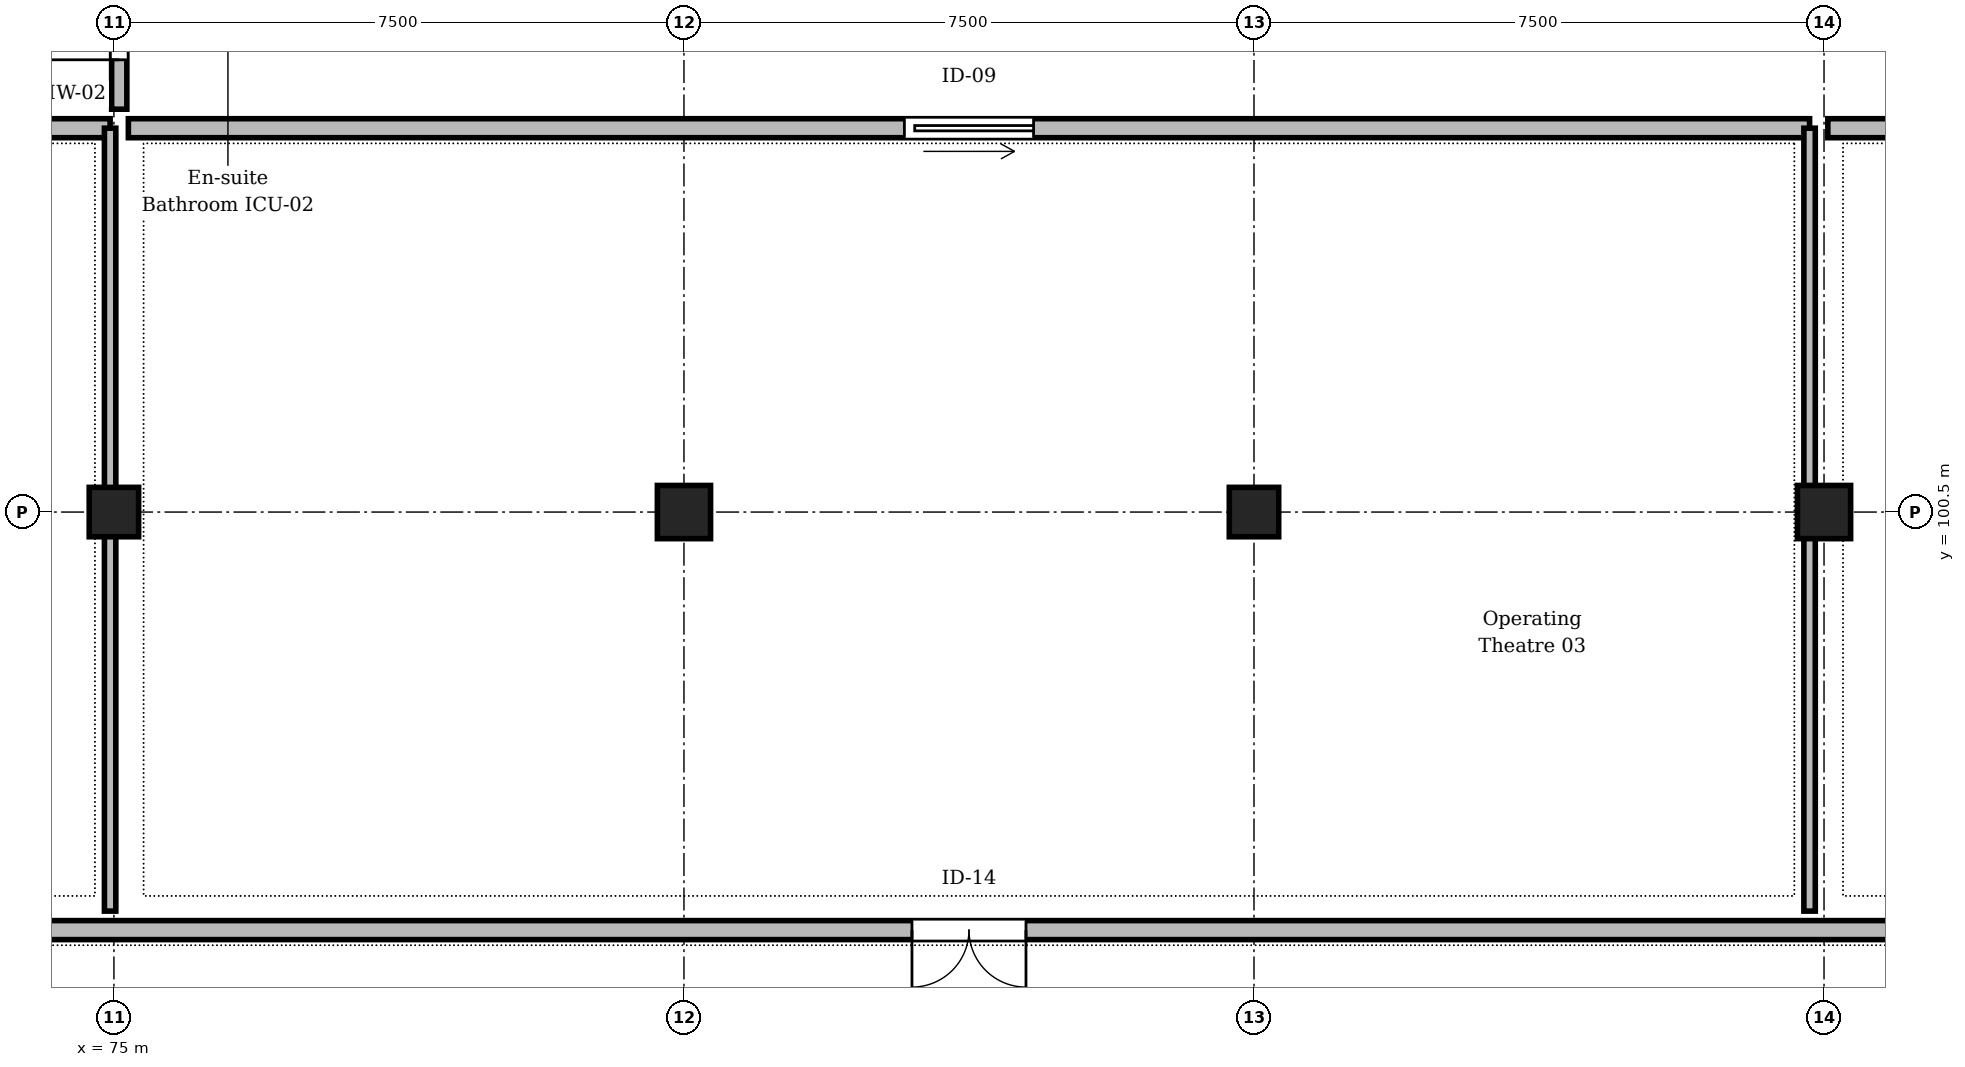
"""IFC4 building model, lengths in metres.
Left out: names, types, materials, properties, quantities, classifications, styles, units other than length and angle.
Written with IfcOpenShell. Run it as: python <this file> out.ifc"""

import sys

from ifc_helpers import new_model, si_unit, direction, frame, frame_2d, origin, origin_2d, place, context, subcontext, project, spatial, rectangle, extrude, element, fill, save


model = new_model("IFC4")
c1 = context("Model", 3, precision=1e-05, world=origin(), true_north=direction((0.0, 1.0)))
c2 = subcontext(c1, "Body", "Model", "MODEL_VIEW")
j1 = project(units=[si_unit("LENGTHUNIT", "METRE"), si_unit("PLANEANGLEUNIT", "RADIAN")], contexts=[c1])
p1 = place(None, origin())
s1 = spatial("IfcSite", under=j1, at=p1, CompositionType="ELEMENT")
p2 = place(p1, origin())
s2 = spatial("IfcBuilding", under=s1, at=p2, CompositionType="ELEMENT")
p3 = place(p2, frame((0.0, 0.0, 9.3)))
s3 = spatial("IfcBuildingStorey", under=s2, at=p3, CompositionType="ELEMENT", Elevation=9.3)
p4 = place(p3, frame((75.0, 100.5, 0.0), z_axis=(0.0, 0.0, 1.0), x_axis=(1.0, 0.0, 0.0)))
e1 = element("IfcColumn", 1, at=p4, inside=s3, PredefinedType="COLUMN", context=c2, shape_type="SweptSolid", body=[
    extrude(rectangle(XDim=0.65, YDim=0.65, at=origin_2d()), origin(), (0.0, 0.0, 1.0), 4.8),
])
p5 = place(p3, frame((82.5, 100.5, 0.0), z_axis=(0.0, 0.0, 1.0), x_axis=(1.0, 0.0, 0.0)))
e2 = element("IfcColumn", 2, at=p5, inside=s3, PredefinedType="COLUMN", context=c2, shape_type="SweptSolid", body=[
    extrude(rectangle(XDim=0.7, YDim=0.7, at=origin_2d()), origin(), (0.0, 0.0, 1.0), 4.8),
])
p6 = place(p3, frame((90.0, 100.5, 0.0), z_axis=(0.0, 0.0, 1.0), x_axis=(1.0, 0.0, 0.0)))
e3 = element("IfcColumn", 3, at=p6, inside=s3, PredefinedType="COLUMN", context=c2, shape_type="SweptSolid", body=[
    extrude(rectangle(XDim=0.65, YDim=0.65, at=origin_2d()), origin(), (0.0, 0.0, 1.0), 4.8),
])
p7 = place(p3, frame((97.5, 100.5, 0.0), z_axis=(0.0, 0.0, 1.0), x_axis=(1.0, 0.0, 0.0)))
e4 = element("IfcColumn", 4, at=p7, inside=s3, PredefinedType="COLUMN", context=c2, shape_type="SweptSolid", body=[
    extrude(rectangle(XDim=0.7, YDim=0.7, at=origin_2d()), origin(), (0.0, 0.0, 1.0), 4.8),
])
p8 = place(p3, frame((142.15, 95.0, 0.0), z_axis=(0.0, 0.0, 1.0), x_axis=(-1.0, 0.0, 0.0)))
e5 = element("IfcWall", 5, at=p8, inside=s3, PredefinedType="STANDARD", context=c2, shape_type="SweptSolid", body=[
    extrude(rectangle(XDim=111.8, YDim=0.25, at=frame_2d((55.9, 0.0))), origin(), (0.0, 0.0, 1.0), 4.535),
])
p9 = place(p8, frame((55.15, 0.0, 0.0)))
e6 = element("IfcOpeningElement", 6, at=p9, cuts=e5, PredefinedType="OPENING", context=c2, shape_type="SweptSolid", body=[
    extrude(rectangle(XDim=1.5, YDim=2.3, at=frame_2d((0.75, 1.15))), frame((0.0, 0.135, 0.0), z_axis=(0.0, -1.0, 0.0), x_axis=(1.0, 0.0, 0.0)), (0.0, 0.0, 1.0), 0.27),
])
p10 = place(p3, frame((74.95, 105.55, 0.0), z_axis=(0.0, 0.0, 1.0), x_axis=(-1.0, 0.0, 0.0)))
e7 = element("IfcWall", 7, at=p10, inside=s3, PredefinedType="STANDARD", context=c2, shape_type="SweptSolid", body=[
    extrude(rectangle(XDim=22.12, YDim=0.25, at=frame_2d((11.06, 0.0))), origin(), (0.0, 0.0, 1.0), 4.535),
])
p11 = place(p10, frame((10.21, 0.0, 0.0)))
e8 = element("IfcOpeningElement", 8, at=p11, cuts=e7, PredefinedType="OPENING", context=c2, shape_type="SweptSolid", body=[
    extrude(rectangle(XDim=1.7, YDim=2.4, at=frame_2d((0.85, 1.2))), frame((0.0, 0.135, 0.0), z_axis=(0.0, -1.0, 0.0), x_axis=(1.0, 0.0, 0.0)), (0.0, 0.0, 1.0), 0.27),
])
p12 = place(p3, frame((97.31, 105.55, 0.0), z_axis=(0.0, 0.0, 1.0), x_axis=(-1.0, 0.0, 0.0)))
e9 = element("IfcWall", 9, at=p12, inside=s3, PredefinedType="STANDARD", context=c2, shape_type="SweptSolid", body=[
    extrude(rectangle(XDim=22.12, YDim=0.25, at=frame_2d((11.06, 0.0))), origin(), (0.0, 0.0, 1.0), 4.535),
])
p13 = place(p12, frame((10.21, 0.0, 0.0)))
e10 = element("IfcOpeningElement", 10, at=p13, cuts=e9, PredefinedType="OPENING", context=c2, shape_type="SweptSolid", body=[
    extrude(rectangle(XDim=1.7, YDim=2.4, at=frame_2d((0.85, 1.2))), frame((0.0, 0.135, 0.0), z_axis=(0.0, -1.0, 0.0), x_axis=(1.0, 0.0, 0.0)), (0.0, 0.0, 1.0), 0.27),
])
p14 = place(p3, frame((119.67, 105.55, 0.0), z_axis=(0.0, 0.0, 1.0), x_axis=(-1.0, 0.0, 0.0)))
e11 = element("IfcWall", 11, at=p14, inside=s3, PredefinedType="STANDARD", context=c2, shape_type="SweptSolid", body=[
    extrude(rectangle(XDim=22.12, YDim=0.25, at=frame_2d((11.06, 0.0))), origin(), (0.0, 0.0, 1.0), 4.535),
])
p15 = place(p14, frame((10.21, 0.0, 0.0)))
e12 = element("IfcOpeningElement", 12, at=p15, cuts=e11, PredefinedType="OPENING", context=c2, shape_type="SweptSolid", body=[
    extrude(rectangle(XDim=1.7, YDim=2.4, at=frame_2d((0.85, 1.2))), frame((0.0, 0.135, 0.0), z_axis=(0.0, -1.0, 0.0), x_axis=(1.0, 0.0, 0.0)), (0.0, 0.0, 1.0), 0.27),
])
for number, where, z_axis, x_axis in (
    (13, (74.95, 95.25, 0.0), (0.0, 0.0, 1.0), (0.0, 1.0, 0.0)),
    (14, (97.31, 95.25, 0.0), (0.0, 0.0, 1.0), (0.0, 1.0, 0.0)),
):
    element("IfcWall", number, at=place(p3, frame(where, z_axis=z_axis, x_axis=x_axis)), inside=s3, PredefinedType="PARTITIONING", context=c2, shape_type="SweptSolid", body=[
        extrude(rectangle(XDim=10.3, YDim=0.15, at=frame_2d((5.15, 0.0))), origin(), (0.0, 0.0, 1.0), 3.835),
    ])
p16 = place(p3, frame((75.07, 105.8, 0.0), z_axis=(0.0, 0.0, 1.0), x_axis=(0.0, 1.0, 0.0)))
e15 = element("IfcWall", 15, at=p16, inside=s3, PredefinedType="STANDARD", context=c2, shape_type="SweptSolid", body=[
    extrude(rectangle(XDim=3.3, YDim=0.2, at=frame_2d((1.65, 0.0))), origin(), (0.0, 0.0, 1.0), 3.835),
])
p17 = place(p16, frame((0.65, 0.0, 0.0)))
e16 = element("IfcOpeningElement", 16, at=p17, cuts=e15, PredefinedType="OPENING", context=c2, shape_type="SweptSolid", body=[
    extrude(rectangle(XDim=2.0, YDim=2.3, at=frame_2d((1.0, 1.15))), frame((0.0, 0.11, 0.0), z_axis=(0.0, -1.0, 0.0), x_axis=(1.0, 0.0, 0.0)), (0.0, 0.0, 1.0), 0.22),
])
p18 = place(p9, origin())
e17 = element("IfcDoor", 17, at=p18, inside=s3, OperationType="DOUBLE_DOOR_SINGLE_SWING", PredefinedType="DOOR", context=c2, shape_type="SweptSolid", body=[
    extrude(rectangle(XDim=1.5, YDim=2.3, at=frame_2d((0.75, 1.15))), frame((0.0, 0.025, 0.0), z_axis=(0.0, -1.0, 0.0), x_axis=(1.0, 0.0, 0.0)), (0.0, 0.0, 1.0), 0.05),
])
fill(e6, e17)
p19 = place(p13, origin())
e18 = element("IfcDoor", 18, at=p19, inside=s3, OperationType="DOUBLE_DOOR_SLIDING", PredefinedType="DOOR", context=c2, shape_type="SweptSolid", body=[
    extrude(rectangle(XDim=1.7, YDim=2.4, at=frame_2d((0.85, 1.2))), frame((0.0, 0.025, 0.0), z_axis=(0.0, -1.0, 0.0), x_axis=(1.0, 0.0, 0.0)), (0.0, 0.0, 1.0), 0.05),
])
fill(e10, e18)
p20 = place(p17, origin())
e19 = element("IfcDoor", 19, at=p20, inside=s3, OperationType="DOUBLE_DOOR_SINGLE_SWING", PredefinedType="DOOR", context=c2, shape_type="SweptSolid", body=[
    extrude(rectangle(XDim=2.0, YDim=2.3, at=frame_2d((1.0, 1.15))), frame((0.0, 0.025, 0.0), z_axis=(0.0, -1.0, 0.0), x_axis=(1.0, 0.0, 0.0)), (0.0, 0.0, 1.0), 0.05),
])
fill(e16, e19)
save(model, sys.argv[1])
